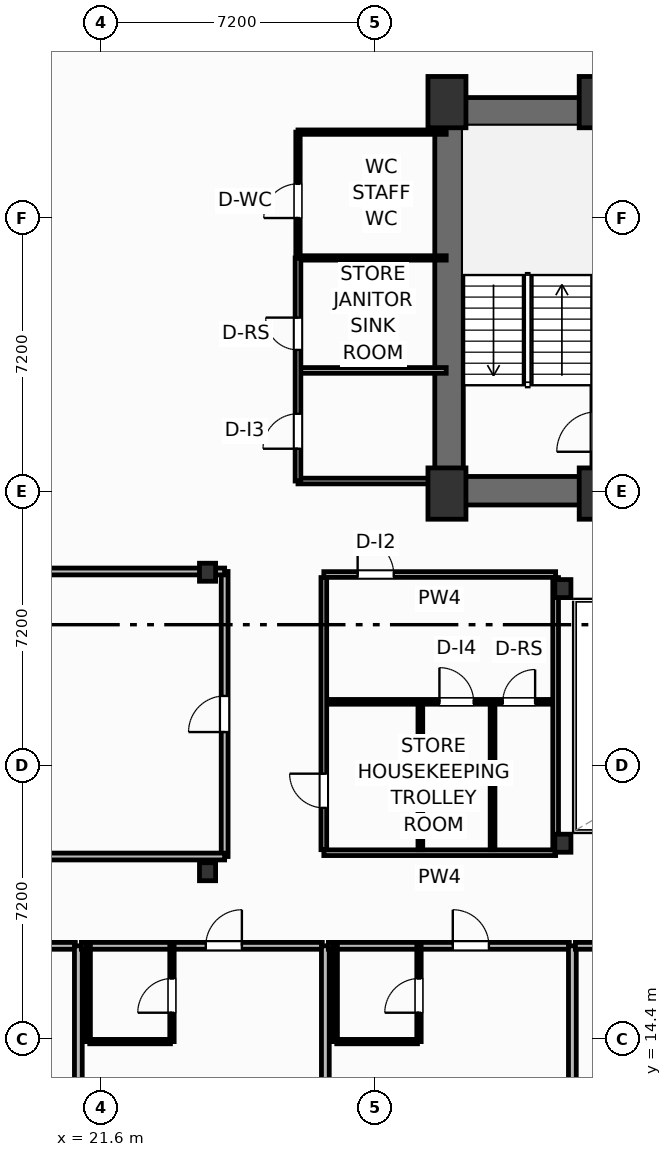
"""IFC4 building model, lengths in metres.
Left out: names, types, materials, properties, quantities, classifications, styles, units other than length and angle.
Written with IfcOpenShell. Run it as: python <this file> out.ifc"""

import sys

from ifc_helpers import new_model, si_unit, direction, frame, frame_2d, origin, origin_2d, place, context, subcontext, project, spatial, rectangle, i_section, extrude, element, fill, save


model = new_model("IFC4")
c1 = context("Model", 3, precision=1e-05, world=origin(), true_north=direction((0.0, 1.0)))
c2 = subcontext(c1, "Body", "Model", "MODEL_VIEW")
j1 = project(units=[si_unit("LENGTHUNIT", "METRE"), si_unit("PLANEANGLEUNIT", "RADIAN")], contexts=[c1])
p1 = place(None, origin())
s1 = spatial("IfcSite", under=j1, at=p1, CompositionType="ELEMENT")
p2 = place(p1, origin())
s2 = spatial("IfcBuilding", under=s1, at=p2, CompositionType="ELEMENT")
p3 = place(p2, frame((0.0, 0.0, 125.4)))
s3 = spatial("IfcBuildingStorey", under=s2, at=p3, CompositionType="ELEMENT", Elevation=125.4)
for number, where, z_axis, x_axis in (
    (1, (30.7, 28.75, 0.0), (0.0, 0.0, 1.0), (1.0, 0.0, 0.0)),
    (2, (34.68, 28.75, 0.0), (0.0, 0.0, 1.0), (1.0, 0.0, 0.0)),
    (3, (30.7, 39.05, 0.0), (0.0, 0.0, 1.0), (1.0, 0.0, 0.0)),
    (4, (34.68, 39.05, 0.0), (0.0, 0.0, 1.0), (1.0, 0.0, 0.0)),
):
    element("IfcColumn", number, at=place(p3, frame(where, z_axis=z_axis, x_axis=x_axis)), inside=s3, PredefinedType="COLUMN", context=c2, shape_type="SweptSolid", body=[
        extrude(rectangle(XDim=1.0, YDim=1.35, at=origin_2d()), origin(), (0.0, 0.0, 1.0), 3.7),
    ])
for number, where, z_axis, x_axis in (
    (5, (33.75, 19.55, 0.0), (0.0, 0.0, 1.0), (1.0, 0.0, 0.0)),
    (6, (33.75, 26.25, 0.0), (0.0, 0.0, 1.0), (1.0, 0.0, 0.0)),
    (7, (24.4, 18.8, 0.0), (0.0, 0.0, 1.0), (1.0, 0.0, 0.0)),
    (8, (24.4, 26.68, 0.0), (0.0, 0.0, 1.0), (1.0, 0.0, 0.0)),
):
    element("IfcColumn", number, at=place(p3, frame(where, z_axis=z_axis, x_axis=x_axis)), inside=s3, PredefinedType="COLUMN", context=c2, shape_type="SweptSolid", body=[
        extrude(i_section(OverallWidth=0.424, OverallDepth=0.474, WebThickness=0.048, FlangeThickness=0.077, FilletRadius=0.025, at=origin_2d()), origin(), (0.0, 0.0, 1.0), 3.7),
    ])
p4 = place(p3, frame((30.38, 38.795, 0.0), z_axis=(0.0, 0.0, 1.0), x_axis=(1.0, 0.0, 0.0)))
e9 = element("IfcWall", 9, at=p4, inside=s3, PredefinedType="SHEAR", context=c2, shape_type="SweptSolid", body=[
    extrude(rectangle(XDim=17.64, YDim=0.75, at=frame_2d((8.82, 0.0))), origin(), (0.0, 0.0, 1.0), 3.45),
])
p5 = place(p3, frame((30.755, 29.2, 0.0), z_axis=(0.0, 0.0, 1.0), x_axis=(0.0, 1.0, 0.0)))
e10 = element("IfcWall", 10, at=p5, inside=s3, PredefinedType="SHEAR", context=c2, shape_type="SweptSolid", body=[
    extrude(rectangle(XDim=9.22, YDim=0.75, at=frame_2d((4.61, 0.0))), origin(), (0.0, 0.0, 1.0), 3.45),
])
p6 = place(p3, frame((30.38, 28.825, 0.0), z_axis=(0.0, 0.0, 1.0), x_axis=(1.0, 0.0, 0.0)))
e11 = element("IfcWall", 11, at=p6, inside=s3, PredefinedType="SHEAR", context=c2, shape_type="SweptSolid", body=[
    extrude(rectangle(XDim=4.42, YDim=0.75, at=frame_2d((2.21, 0.0))), origin(), (0.0, 0.0, 1.0), 3.45),
])
p7 = place(p3, frame((34.64, 29.2, 0.0), z_axis=(0.0, 0.0, 1.0), x_axis=(0.0, 1.0, 0.0)))
e12 = element("IfcWall", 12, at=p7, inside=s3, PredefinedType="SHEAR", context=c2, shape_type="SweptSolid", body=[
    extrude(rectangle(XDim=9.22, YDim=0.25, at=frame_2d((4.61, 0.0))), origin(), (0.0, 0.0, 1.0), 3.45),
])
p8 = place(p7, frame((0.65, 0.0, 0.0)))
e13 = element("IfcOpeningElement", 13, at=p8, cuts=e12, PredefinedType="OPENING", context=c2, shape_type="SweptSolid", body=[
    extrude(rectangle(XDim=1.05, YDim=2.15, at=frame_2d((0.525, 1.075))), frame((0.0, 0.135, 0.0), z_axis=(0.0, -1.0, 0.0), x_axis=(1.0, 0.0, 0.0)), (0.0, 0.0, 1.0), 0.27),
])
p9 = place(p3, frame((14.58, 16.85, 0.0), z_axis=(0.0, 0.0, 1.0), x_axis=(1.0, 0.0, 0.0)))
e14 = element("IfcWall", 14, at=p9, inside=s3, PredefinedType="PARTITIONING", context=c2, shape_type="SweptSolid", body=[
    extrude(rectangle(XDim=6.34, YDim=0.18, at=frame_2d((3.17, 0.0))), origin(), (0.0, 0.0, 1.0), 3.45),
])
p10 = place(p9, frame((3.274, 0.0, 0.0)))
e15 = element("IfcOpeningElement", 15, at=p10, cuts=e14, PredefinedType="OPENING", context=c2, shape_type="SweptSolid", body=[
    extrude(rectangle(XDim=0.95, YDim=2.15, at=frame_2d((0.475, 1.075))), frame((0.0, 0.1, 0.0), z_axis=(0.0, -1.0, 0.0), x_axis=(1.0, 0.0, 0.0)), (0.0, 0.0, 1.0), 0.2),
])
p11 = place(p3, frame((21.0, 4.076, 0.0), z_axis=(0.0, 0.0, 1.0), x_axis=(0.0, 1.0, 0.0)))
e16 = element("IfcWall", 16, at=p11, inside=s3, PredefinedType="PARTITIONING", context=c2, shape_type="SweptSolid", body=[
    extrude(rectangle(XDim=12.774, YDim=0.205, at=frame_2d((6.387, 0.0))), origin(), (0.0, 0.0, 1.0), 3.45),
])
p12 = place(p3, frame((21.08, 16.85, 0.0), z_axis=(0.0, 0.0, 1.0), x_axis=(1.0, 0.0, 0.0)))
e17 = element("IfcWall", 17, at=p12, inside=s3, PredefinedType="PARTITIONING", context=c2, shape_type="SweptSolid", body=[
    extrude(rectangle(XDim=6.34, YDim=0.18, at=frame_2d((3.17, 0.0))), origin(), (0.0, 0.0, 1.0), 3.45),
])
p13 = place(p12, frame((3.274, 0.0, 0.0)))
e18 = element("IfcOpeningElement", 18, at=p13, cuts=e17, PredefinedType="OPENING", context=c2, shape_type="SweptSolid", body=[
    extrude(rectangle(XDim=0.95, YDim=2.15, at=frame_2d((0.475, 1.075))), frame((0.0, 0.1, 0.0), z_axis=(0.0, -1.0, 0.0), x_axis=(1.0, 0.0, 0.0)), (0.0, 0.0, 1.0), 0.2),
])
p14 = place(p3, frame((21.3, 14.33, 0.0), z_axis=(0.0, 0.0, 1.0), x_axis=(1.0, 0.0, 0.0)))
e19 = element("IfcWall", 19, at=p14, inside=s3, PredefinedType="PARTITIONING", context=c2, shape_type="SweptSolid", body=[
    extrude(rectangle(XDim=2.124, YDim=0.115, at=frame_2d((1.062, 0.0))), origin(), (0.0, 0.0, 1.0), 3.45),
])
p15 = place(p3, frame((23.464, 14.33, 0.0), z_axis=(0.0, 0.0, 1.0), x_axis=(0.0, 1.0, 0.0)))
e20 = element("IfcWall", 20, at=p15, inside=s3, PredefinedType="PARTITIONING", context=c2, shape_type="SweptSolid", body=[
    extrude(rectangle(XDim=2.52, YDim=0.115, at=frame_2d((1.26, 0.0))), origin(), (0.0, 0.0, 1.0), 3.45),
])
p16 = place(p15, frame((0.76, 0.0, 0.0)))
e21 = element("IfcOpeningElement", 21, at=p16, cuts=e20, PredefinedType="OPENING", context=c2, shape_type="SweptSolid", body=[
    extrude(rectangle(XDim=0.9, YDim=2.05, at=frame_2d((0.45, 1.025))), frame((0.0, 0.067, 0.0), z_axis=(0.0, -1.0, 0.0), x_axis=(1.0, 0.0, 0.0)), (0.0, 0.0, 1.0), 0.135),
])
p17 = place(p3, frame((21.26, 14.33, 0.0), z_axis=(0.0, 0.0, 1.0), x_axis=(0.0, 1.0, 0.0)))
e22 = element("IfcWall", 22, at=p17, inside=s3, PredefinedType="PARTITIONING", context=c2, shape_type="SweptSolid", body=[
    extrude(rectangle(XDim=2.52, YDim=0.115, at=frame_2d((1.26, 0.0))), origin(), (0.0, 0.0, 1.0), 3.45),
])
p18 = place(p3, frame((27.5, 5.403, 0.0), z_axis=(0.0, 0.0, 1.0), x_axis=(0.0, 1.0, 0.0)))
e23 = element("IfcWall", 23, at=p18, inside=s3, PredefinedType="PARTITIONING", context=c2, shape_type="SweptSolid", body=[
    extrude(rectangle(XDim=11.447, YDim=0.205, at=frame_2d((5.723, 0.0))), origin(), (0.0, 0.0, 1.0), 2.662),
])
p19 = place(p3, frame((27.58, 16.85, 0.0), z_axis=(0.0, 0.0, 1.0), x_axis=(1.0, 0.0, 0.0)))
e24 = element("IfcWall", 24, at=p19, inside=s3, PredefinedType="PARTITIONING", context=c2, shape_type="SweptSolid", body=[
    extrude(rectangle(XDim=6.34, YDim=0.18, at=frame_2d((3.17, 0.0))), origin(), (0.0, 0.0, 1.0), 3.45),
])
p20 = place(p19, frame((3.274, 0.0, 0.0)))
e25 = element("IfcOpeningElement", 25, at=p20, cuts=e24, PredefinedType="OPENING", context=c2, shape_type="SweptSolid", body=[
    extrude(rectangle(XDim=0.95, YDim=2.15, at=frame_2d((0.475, 1.075))), frame((0.0, 0.1, 0.0), z_axis=(0.0, -1.0, 0.0), x_axis=(1.0, 0.0, 0.0)), (0.0, 0.0, 1.0), 0.2),
])
p21 = place(p3, frame((27.8, 14.33, 0.0), z_axis=(0.0, 0.0, 1.0), x_axis=(1.0, 0.0, 0.0)))
e26 = element("IfcWall", 26, at=p21, inside=s3, PredefinedType="PARTITIONING", context=c2, shape_type="SweptSolid", body=[
    extrude(rectangle(XDim=2.124, YDim=0.115, at=frame_2d((1.062, 0.0))), origin(), (0.0, 0.0, 1.0), 3.45),
])
p22 = place(p3, frame((29.964, 14.33, 0.0), z_axis=(0.0, 0.0, 1.0), x_axis=(0.0, 1.0, 0.0)))
e27 = element("IfcWall", 27, at=p22, inside=s3, PredefinedType="PARTITIONING", context=c2, shape_type="SweptSolid", body=[
    extrude(rectangle(XDim=2.52, YDim=0.115, at=frame_2d((1.26, 0.0))), origin(), (0.0, 0.0, 1.0), 3.45),
])
p23 = place(p22, frame((0.76, 0.0, 0.0)))
e28 = element("IfcOpeningElement", 28, at=p23, cuts=e27, PredefinedType="OPENING", context=c2, shape_type="SweptSolid", body=[
    extrude(rectangle(XDim=0.9, YDim=2.05, at=frame_2d((0.45, 1.025))), frame((0.0, 0.067, 0.0), z_axis=(0.0, -1.0, 0.0), x_axis=(1.0, 0.0, 0.0)), (0.0, 0.0, 1.0), 0.135),
])
p24 = place(p3, frame((27.76, 14.33, 0.0), z_axis=(0.0, 0.0, 1.0), x_axis=(0.0, 1.0, 0.0)))
e29 = element("IfcWall", 29, at=p24, inside=s3, PredefinedType="PARTITIONING", context=c2, shape_type="SweptSolid", body=[
    extrude(rectangle(XDim=2.52, YDim=0.115, at=frame_2d((1.26, 0.0))), origin(), (0.0, 0.0, 1.0), 3.45),
])
p25 = place(p3, frame((34.0, 2.5, 0.0), z_axis=(0.0, 0.0, 1.0), x_axis=(0.0, 1.0, 0.0)))
e30 = element("IfcWall", 30, at=p25, inside=s3, PredefinedType="PARTITIONING", context=c2, shape_type="SweptSolid", body=[
    extrude(rectangle(XDim=14.35, YDim=0.205, at=frame_2d((7.175, 0.0))), origin(), (0.0, 0.0, 1.0), 3.45),
])
p26 = place(p3, frame((34.08, 16.85, 0.0), z_axis=(0.0, 0.0, 1.0), x_axis=(1.0, 0.0, 0.0)))
e31 = element("IfcWall", 31, at=p26, inside=s3, PredefinedType="PARTITIONING", context=c2, shape_type="SweptSolid", body=[
    extrude(rectangle(XDim=6.34, YDim=0.18, at=frame_2d((3.17, 0.0))), origin(), (0.0, 0.0, 1.0), 3.45),
])
p27 = place(p26, frame((0.91, 0.0, 0.0)))
e32 = element("IfcOpeningElement", 32, at=p27, cuts=e31, PredefinedType="OPENING", context=c2, shape_type="SweptSolid", body=[
    extrude(rectangle(XDim=0.95, YDim=2.15, at=frame_2d((0.475, 1.075))), frame((0.0, 0.1, 0.0), z_axis=(0.0, -1.0, 0.0), x_axis=(1.0, 0.0, 0.0)), (0.0, 0.0, 1.0), 0.2),
])
p28 = place(p3, frame((24.85, 19.2, 0.0), z_axis=(0.0, 0.0, 1.0), x_axis=(0.0, 1.0, 0.0)))
e33 = element("IfcWall", 33, at=p28, inside=s3, PredefinedType="PARTITIONING", context=c2, shape_type="SweptSolid", body=[
    extrude(rectangle(XDim=7.5, YDim=0.18, at=frame_2d((3.75, 0.0))), origin(), (0.0, 0.0, 1.0), 3.45),
])
p29 = place(p28, frame((3.275, 0.0, 0.0)))
e34 = element("IfcOpeningElement", 34, at=p29, cuts=e33, PredefinedType="OPENING", context=c2, shape_type="SweptSolid", body=[
    extrude(rectangle(XDim=0.95, YDim=2.05, at=frame_2d((0.475, 1.025))), frame((0.0, 0.1, 0.0), z_axis=(0.0, -1.0, 0.0), x_axis=(1.0, 0.0, 0.0)), (0.0, 0.0, 1.0), 0.2),
])
p30 = place(p3, frame((1.169, 19.2, 0.0), z_axis=(0.0, 0.0, 1.0), x_axis=(1.0, 0.0, 0.0)))
e35 = element("IfcWall", 35, at=p30, inside=s3, PredefinedType="PARTITIONING", context=c2, shape_type="SweptSolid", body=[
    extrude(rectangle(XDim=23.681, YDim=0.18, at=frame_2d((11.84, 0.0))), origin(), (0.0, 0.0, 1.0), 3.45),
])
p31 = place(p3, frame((2.078, 26.7, 0.0), z_axis=(0.0, 0.0, 1.0), x_axis=(1.0, 0.0, 0.0)))
e36 = element("IfcWall", 36, at=p31, inside=s3, PredefinedType="PARTITIONING", context=c2, shape_type="SweptSolid", body=[
    extrude(rectangle(XDim=22.772, YDim=0.18, at=frame_2d((11.386, 0.0))), origin(), (0.0, 0.0, 1.0), 2.662),
])
p32 = place(p3, frame((27.46, 26.62, 0.0), z_axis=(0.0, 0.0, 1.0), x_axis=(1.0, 0.0, 0.0)))
e37 = element("IfcWall", 37, at=p32, inside=s3, PredefinedType="PARTITIONING", context=c2, shape_type="SweptSolid", body=[
    extrude(rectangle(XDim=6.1, YDim=0.15, at=frame_2d((3.05, 0.0))), origin(), (0.0, 0.0, 1.0), 2.662),
])
p33 = place(p32, frame((0.89, 0.0, 0.0)))
e38 = element("IfcOpeningElement", 38, at=p33, cuts=e37, PredefinedType="OPENING", context=c2, shape_type="SweptSolid", body=[
    extrude(rectangle(XDim=0.95, YDim=2.05, at=frame_2d((0.475, 1.025))), frame((0.0, 0.085, 0.0), z_axis=(0.0, -1.0, 0.0), x_axis=(1.0, 0.0, 0.0)), (0.0, 0.0, 1.0), 0.17),
])
p34 = place(p3, frame((27.46, 19.3, 0.0), z_axis=(0.0, 0.0, 1.0), x_axis=(1.0, 0.0, 0.0)))
e39 = element("IfcWall", 39, at=p34, inside=s3, PredefinedType="PARTITIONING", context=c2, shape_type="SweptSolid", body=[
    extrude(rectangle(XDim=6.1, YDim=0.15, at=frame_2d((3.05, 0.0))), origin(), (0.0, 0.0, 1.0), 2.662),
])
p35 = place(p3, frame((27.52, 23.27, 0.0), z_axis=(0.0, 0.0, 1.0), x_axis=(1.0, 0.0, 0.0)))
e40 = element("IfcWall", 40, at=p35, inside=s3, PredefinedType="PARTITIONING", context=c2, shape_type="SweptSolid", body=[
    extrude(rectangle(XDim=6.0, YDim=0.125, at=frame_2d((3.0, 0.0))), origin(), (0.0, 0.0, 1.0), 3.45),
])
p36 = place(p35, frame((2.982, 0.0, 0.0)))
e41 = element("IfcOpeningElement", 41, at=p36, cuts=e40, PredefinedType="OPENING", context=c2, shape_type="SweptSolid", body=[
    extrude(rectangle(XDim=0.9, YDim=2.05, at=frame_2d((0.45, 1.025))), frame((0.0, 0.073, 0.0), z_axis=(0.0, -1.0, 0.0), x_axis=(1.0, 0.0, 0.0)), (0.0, 0.0, 1.0), 0.145),
])
p37 = place(p35, frame((4.65, 0.0, 0.0)))
e42 = element("IfcOpeningElement", 42, at=p37, cuts=e40, PredefinedType="OPENING", context=c2, shape_type="SweptSolid", body=[
    extrude(rectangle(XDim=0.85, YDim=2.05, at=frame_2d((0.425, 1.025))), frame((0.0, 0.073, 0.0), z_axis=(0.0, -1.0, 0.0), x_axis=(1.0, 0.0, 0.0)), (0.0, 0.0, 1.0), 0.145),
])
for number, where, z_axis, x_axis in (
    (43, (30.0, 19.38, 0.0), (0.0, 0.0, 1.0), (0.0, 1.0, 0.0)),
    (44, (31.9, 19.38, 0.0), (0.0, 0.0, 1.0), (0.0, 1.0, 0.0)),
):
    element("IfcWall", number, at=place(p3, frame(where, z_axis=z_axis, x_axis=x_axis)), inside=s3, PredefinedType="PARTITIONING", context=c2, shape_type="SweptSolid", body=[
        extrude(rectangle(XDim=3.82, YDim=0.125, at=frame_2d((1.91, 0.0))), origin(), (0.0, 0.0, 1.0), 3.45),
    ])
p38 = place(p3, frame((27.46, 19.38, 0.0), z_axis=(0.0, 0.0, 1.0), x_axis=(0.0, 1.0, 0.0)))
e45 = element("IfcWall", 45, at=p38, inside=s3, PredefinedType="PARTITIONING", context=c2, shape_type="SweptSolid", body=[
    extrude(rectangle(XDim=7.16, YDim=0.15, at=frame_2d((3.58, 0.0))), origin(), (0.0, 0.0, 1.0), 3.45),
])
p39 = place(p38, frame((1.1, 0.0, 0.0)))
e46 = element("IfcOpeningElement", 46, at=p39, cuts=e45, PredefinedType="OPENING", context=c2, shape_type="SweptSolid", body=[
    extrude(rectangle(XDim=0.9, YDim=2.05, at=frame_2d((0.45, 1.025))), frame((0.0, 0.085, 0.0), z_axis=(0.0, -1.0, 0.0), x_axis=(1.0, 0.0, 0.0)), (0.0, 0.0, 1.0), 0.17),
])
p40 = place(p3, frame((33.56, 19.38, 0.0), z_axis=(0.0, 0.0, 1.0), x_axis=(0.0, 1.0, 0.0)))
e47 = element("IfcWall", 47, at=p40, inside=s3, PredefinedType="PARTITIONING", context=c2, shape_type="SweptSolid", body=[
    extrude(rectangle(XDim=7.16, YDim=0.15, at=frame_2d((3.58, 0.0))), origin(), (0.0, 0.0, 1.0), 2.824),
])
p41 = place(p3, frame((26.78, 29.08, 0.0), z_axis=(0.0, 0.0, 1.0), x_axis=(1.0, 0.0, 0.0)))
e48 = element("IfcWall", 48, at=p41, inside=s3, PredefinedType="PARTITIONING", context=c2, shape_type="SweptSolid", body=[
    extrude(rectangle(XDim=3.6, YDim=0.15, at=frame_2d((1.8, 0.0))), origin(), (0.0, 0.0, 1.0), 3.45),
])
p42 = place(p3, frame((26.8, 31.99, 0.0), z_axis=(0.0, 0.0, 1.0), x_axis=(1.0, 0.0, 0.0)))
e49 = element("IfcWall", 49, at=p42, inside=s3, PredefinedType="PARTITIONING", context=c2, shape_type="SweptSolid", body=[
    extrude(rectangle(XDim=3.88, YDim=0.15, at=frame_2d((1.94, 0.0))), origin(), (0.0, 0.0, 1.0), 3.45),
])
p43 = place(p3, frame((26.8, 34.95, 0.0), z_axis=(0.0, 0.0, 1.0), x_axis=(1.0, 0.0, 0.0)))
e50 = element("IfcWall", 50, at=p43, inside=s3, PredefinedType="PARTITIONING", context=c2, shape_type="SweptSolid", body=[
    extrude(rectangle(XDim=3.88, YDim=0.115, at=frame_2d((1.94, 0.0))), origin(), (0.0, 0.0, 1.0), 3.45),
])
p44 = place(p3, frame((26.78, 38.26, 0.0), z_axis=(0.0, 0.0, 1.0), x_axis=(1.0, 0.0, 0.0)))
e51 = element("IfcWall", 51, at=p44, inside=s3, PredefinedType="PARTITIONING", context=c2, shape_type="SweptSolid", body=[
    extrude(rectangle(XDim=3.9, YDim=0.115, at=frame_2d((1.95, 0.0))), origin(), (0.0, 0.0, 1.0), 3.45),
])
p45 = place(p3, frame((26.78, 29.08, 0.0), z_axis=(0.0, 0.0, 1.0), x_axis=(0.0, 1.0, 0.0)))
e52 = element("IfcWall", 52, at=p45, inside=s3, PredefinedType="PARTITIONING", context=c2, shape_type="SweptSolid", body=[
    extrude(rectangle(XDim=5.87, YDim=0.15, at=frame_2d((2.935, 0.0))), origin(), (0.0, 0.0, 1.0), 3.45),
])
p46 = place(p45, frame((0.85, 0.0, 0.0)))
e53 = element("IfcOpeningElement", 53, at=p46, cuts=e52, PredefinedType="OPENING", context=c2, shape_type="SweptSolid", body=[
    extrude(rectangle(XDim=0.92, YDim=2.05, at=frame_2d((0.46, 1.025))), frame((0.0, 0.085, 0.0), z_axis=(0.0, -1.0, 0.0), x_axis=(1.0, 0.0, 0.0)), (0.0, 0.0, 1.0), 0.17),
])
p47 = place(p45, frame((3.45, 0.0, 0.0)))
e54 = element("IfcOpeningElement", 54, at=p47, cuts=e52, PredefinedType="OPENING", context=c2, shape_type="SweptSolid", body=[
    extrude(rectangle(XDim=0.85, YDim=2.05, at=frame_2d((0.425, 1.025))), frame((0.0, 0.085, 0.0), z_axis=(0.0, -1.0, 0.0), x_axis=(1.0, 0.0, 0.0)), (0.0, 0.0, 1.0), 0.17),
])
p48 = place(p3, frame((26.78, 34.95, 0.0), z_axis=(0.0, 0.0, 1.0), x_axis=(0.0, 1.0, 0.0)))
e55 = element("IfcWall", 55, at=p48, inside=s3, PredefinedType="PARTITIONING", context=c2, shape_type="SweptSolid", body=[
    extrude(rectangle(XDim=3.31, YDim=0.115, at=frame_2d((1.655, 0.0))), origin(), (0.0, 0.0, 1.0), 3.45),
])
p49 = place(p48, frame((1.05, 0.0, 0.0)))
e56 = element("IfcOpeningElement", 56, at=p49, cuts=e55, PredefinedType="OPENING", context=c2, shape_type="SweptSolid", body=[
    extrude(rectangle(XDim=0.9, YDim=2.05, at=frame_2d((0.45, 1.025))), frame((0.0, 0.067, 0.0), z_axis=(0.0, -1.0, 0.0), x_axis=(1.0, 0.0, 0.0)), (0.0, 0.0, 1.0), 0.135),
])
p50 = place(p13, origin())
e57 = element("IfcDoor", 57, at=p50, inside=s3, OperationType="SINGLE_SWING_RIGHT", PredefinedType="DOOR", context=c2, shape_type="SweptSolid", body=[
    extrude(rectangle(XDim=0.95, YDim=2.15, at=frame_2d((0.475, 1.075))), frame((0.0, 0.025, 0.0), z_axis=(0.0, -1.0, 0.0), x_axis=(1.0, 0.0, 0.0)), (0.0, 0.0, 1.0), 0.05),
])
fill(e18, e57)
p51 = place(p16, origin())
e58 = element("IfcDoor", 58, at=p51, inside=s3, OperationType="SINGLE_SWING_LEFT", PredefinedType="DOOR", context=c2, shape_type="SweptSolid", body=[
    extrude(rectangle(XDim=0.9, YDim=2.05, at=frame_2d((0.45, 1.025))), frame((0.0, 0.025, 0.0), z_axis=(0.0, -1.0, 0.0), x_axis=(1.0, 0.0, 0.0)), (0.0, 0.0, 1.0), 0.05),
])
fill(e21, e58)
p52 = place(p20, origin())
e59 = element("IfcDoor", 59, at=p52, inside=s3, OperationType="SINGLE_SWING_LEFT", PredefinedType="DOOR", context=c2, shape_type="SweptSolid", body=[
    extrude(rectangle(XDim=0.95, YDim=2.15, at=frame_2d((0.475, 1.075))), frame((0.0, 0.025, 0.0), z_axis=(0.0, -1.0, 0.0), x_axis=(1.0, 0.0, 0.0)), (0.0, 0.0, 1.0), 0.05),
])
fill(e25, e59)
p53 = place(p23, origin())
e60 = element("IfcDoor", 60, at=p53, inside=s3, OperationType="SINGLE_SWING_LEFT", PredefinedType="DOOR", context=c2, shape_type="SweptSolid", body=[
    extrude(rectangle(XDim=0.9, YDim=2.05, at=frame_2d((0.45, 1.025))), frame((0.0, 0.025, 0.0), z_axis=(0.0, -1.0, 0.0), x_axis=(1.0, 0.0, 0.0)), (0.0, 0.0, 1.0), 0.05),
])
fill(e28, e60)
p54 = place(p29, origin())
e61 = element("IfcDoor", 61, at=p54, inside=s3, OperationType="SINGLE_SWING_LEFT", PredefinedType="DOOR", context=c2, shape_type="SweptSolid", body=[
    extrude(rectangle(XDim=0.95, YDim=2.05, at=frame_2d((0.475, 1.025))), frame((0.0, 0.025, 0.0), z_axis=(0.0, -1.0, 0.0), x_axis=(1.0, 0.0, 0.0)), (0.0, 0.0, 1.0), 0.05),
])
fill(e34, e61)
p55 = place(p33, origin())
e62 = element("IfcDoor", 62, at=p55, inside=s3, OperationType="SINGLE_SWING_LEFT", PredefinedType="DOOR", context=c2, shape_type="SweptSolid", body=[
    extrude(rectangle(XDim=0.95, YDim=2.05, at=frame_2d((0.475, 1.025))), frame((0.0, 0.025, 0.0), z_axis=(0.0, -1.0, 0.0), x_axis=(1.0, 0.0, 0.0)), (0.0, 0.0, 1.0), 0.05),
])
fill(e38, e62)
p56 = place(p36, origin())
e63 = element("IfcDoor", 63, at=p56, inside=s3, OperationType="SINGLE_SWING_LEFT", PredefinedType="DOOR", context=c2, shape_type="SweptSolid", body=[
    extrude(rectangle(XDim=0.9, YDim=2.05, at=frame_2d((0.45, 1.025))), frame((0.0, 0.025, 0.0), z_axis=(0.0, -1.0, 0.0), x_axis=(1.0, 0.0, 0.0)), (0.0, 0.0, 1.0), 0.05),
])
fill(e41, e63)
p57 = place(p37, origin())
e64 = element("IfcDoor", 64, at=p57, inside=s3, OperationType="SINGLE_SWING_RIGHT", PredefinedType="DOOR", context=c2, shape_type="SweptSolid", body=[
    extrude(rectangle(XDim=0.85, YDim=2.05, at=frame_2d((0.425, 1.025))), frame((0.0, 0.025, 0.0), z_axis=(0.0, -1.0, 0.0), x_axis=(1.0, 0.0, 0.0)), (0.0, 0.0, 1.0), 0.05),
])
fill(e42, e64)
p58 = place(p39, origin())
e65 = element("IfcDoor", 65, at=p58, inside=s3, OperationType="SINGLE_SWING_RIGHT", PredefinedType="DOOR", context=c2, shape_type="SweptSolid", body=[
    extrude(rectangle(XDim=0.9, YDim=2.05, at=frame_2d((0.45, 1.025))), frame((0.0, 0.025, 0.0), z_axis=(0.0, -1.0, 0.0), x_axis=(1.0, 0.0, 0.0)), (0.0, 0.0, 1.0), 0.05),
])
fill(e46, e65)
p59 = place(p46, origin())
e66 = element("IfcDoor", 66, at=p59, inside=s3, OperationType="SINGLE_SWING_LEFT", PredefinedType="DOOR", context=c2, shape_type="SweptSolid", body=[
    extrude(rectangle(XDim=0.92, YDim=2.05, at=frame_2d((0.46, 1.025))), frame((0.0, 0.025, 0.0), z_axis=(0.0, -1.0, 0.0), x_axis=(1.0, 0.0, 0.0)), (0.0, 0.0, 1.0), 0.05),
])
fill(e53, e66)
p60 = place(p47, origin())
e67 = element("IfcDoor", 67, at=p60, inside=s3, OperationType="SINGLE_SWING_RIGHT", PredefinedType="DOOR", context=c2, shape_type="SweptSolid", body=[
    extrude(rectangle(XDim=0.85, YDim=2.05, at=frame_2d((0.425, 1.025))), frame((0.0, 0.025, 0.0), z_axis=(0.0, -1.0, 0.0), x_axis=(1.0, 0.0, 0.0)), (0.0, 0.0, 1.0), 0.05),
])
fill(e54, e67)
p61 = place(p49, origin())
e68 = element("IfcDoor", 68, at=p61, inside=s3, OperationType="SINGLE_SWING_LEFT", PredefinedType="DOOR", context=c2, shape_type="SweptSolid", body=[
    extrude(rectangle(XDim=0.9, YDim=2.05, at=frame_2d((0.45, 1.025))), frame((0.0, 0.025, 0.0), z_axis=(0.0, -1.0, 0.0), x_axis=(1.0, 0.0, 0.0)), (0.0, 0.0, 1.0), 0.05),
])
fill(e56, e68)
save(model, sys.argv[1])
